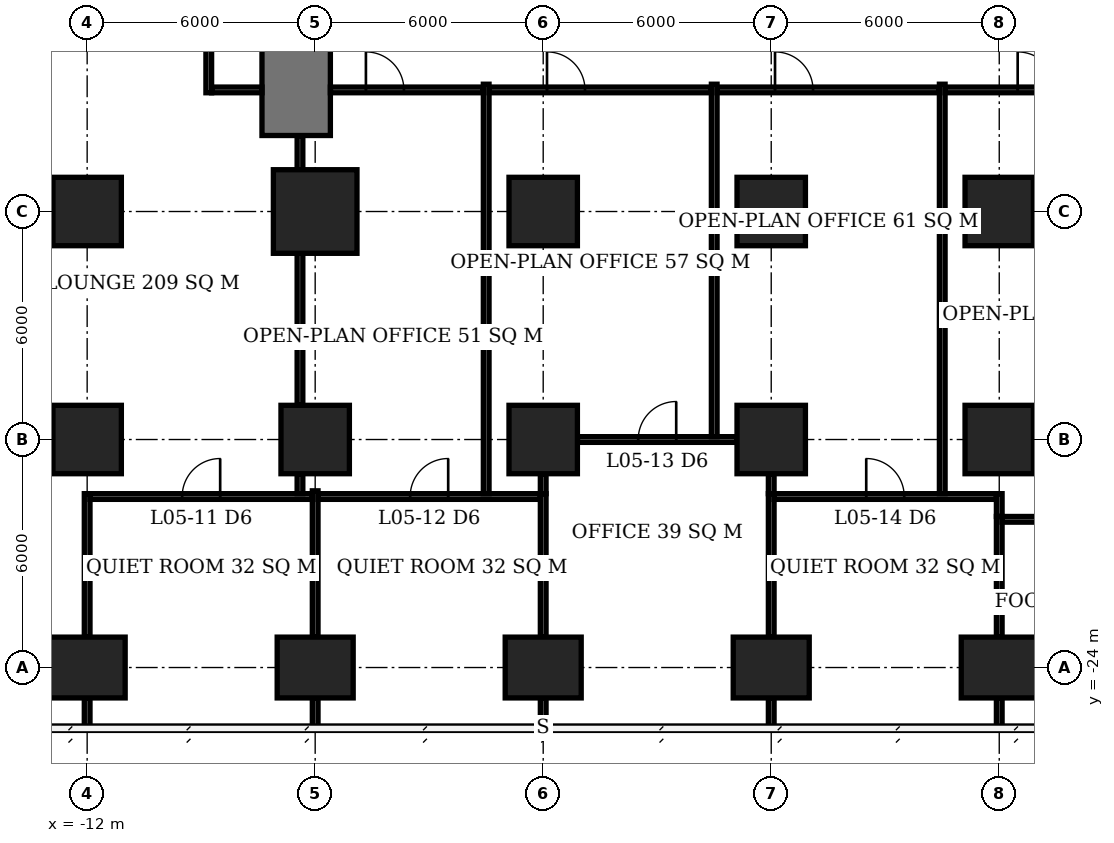
"""IFC4 building model, lengths in metres.
Left out: names, types, materials, properties, quantities, classifications, styles, units other than length and angle.
Written with IfcOpenShell. Run it as: python <this file> out.ifc"""

import sys

from ifc_helpers import new_model, si_unit, direction, frame, frame_2d, origin, origin_2d, place, context, subcontext, project, spatial, rectangle, extrude, element, fill, save


model = new_model("IFC4")
c1 = context("Model", 3, precision=1e-05, world=origin(), true_north=direction((0.0, 1.0)))
c2 = subcontext(c1, "Body", "Model", "MODEL_VIEW")
j1 = project(units=[si_unit("LENGTHUNIT", "METRE"), si_unit("PLANEANGLEUNIT", "RADIAN")], contexts=[c1])
p1 = place(None, origin())
s1 = spatial("IfcSite", under=j1, at=p1, CompositionType="ELEMENT")
p2 = place(p1, origin())
s2 = spatial("IfcBuilding", under=s1, at=p2, CompositionType="ELEMENT")
p3 = place(p2, frame((0.0, 0.0, 26.0)))
s3 = spatial("IfcBuildingStorey", under=s2, at=p3, CompositionType="ELEMENT", Elevation=26.0)
p4 = place(p3, frame((-12.0, -24.0, 0.0), z_axis=(0.0, 0.0, 1.0), x_axis=(1.0, 0.0, 0.0)))
e1 = element("IfcColumn", 1, at=p4, inside=s3, PredefinedType="COLUMN", context=c2, shape_type="SweptSolid", body=[
    extrude(rectangle(XDim=2.0, YDim=1.6, at=origin_2d()), origin(), (0.0, 0.0, 1.0), 3.9),
])
for number, where, z_axis, x_axis in (
    (2, (-12.0, -18.0, 0.0), (0.0, 0.0, 1.0), (1.0, 0.0, 0.0)),
    (3, (-12.0, -12.0, 0.0), (0.0, 0.0, 1.0), (1.0, 0.0, 0.0)),
):
    element("IfcColumn", number, at=place(p3, frame(where, z_axis=z_axis, x_axis=x_axis)), inside=s3, PredefinedType="COLUMN", context=c2, shape_type="SweptSolid", body=[
        extrude(rectangle(XDim=1.8, YDim=1.8, at=origin_2d()), origin(), (0.0, 0.0, 1.0), 3.9),
    ])
p5 = place(p3, frame((-6.0, -24.0, 0.0), z_axis=(0.0, 0.0, 1.0), x_axis=(1.0, 0.0, 0.0)))
e4 = element("IfcColumn", 4, at=p5, inside=s3, PredefinedType="COLUMN", context=c2, shape_type="SweptSolid", body=[
    extrude(rectangle(XDim=2.0, YDim=1.6, at=origin_2d()), origin(), (0.0, 0.0, 1.0), 3.9),
])
p6 = place(p3, frame((-6.0, -18.0, 0.0), z_axis=(0.0, 0.0, 1.0), x_axis=(1.0, 0.0, 0.0)))
e5 = element("IfcColumn", 5, at=p6, inside=s3, PredefinedType="COLUMN", context=c2, shape_type="SweptSolid", body=[
    extrude(rectangle(XDim=1.8, YDim=1.8, at=origin_2d()), origin(), (0.0, 0.0, 1.0), 3.9),
])
p7 = place(p3, frame((-6.0, -12.0, 0.0), z_axis=(0.0, 0.0, 1.0), x_axis=(1.0, 0.0, 0.0)))
e6 = element("IfcColumn", 6, at=p7, inside=s3, PredefinedType="COLUMN", context=c2, shape_type="SweptSolid", body=[
    extrude(rectangle(XDim=2.2, YDim=2.2, at=origin_2d()), origin(), (0.0, 0.0, 1.0), 3.9),
])
p8 = place(p3, frame((0.0, -24.0, 0.0), z_axis=(0.0, 0.0, 1.0), x_axis=(1.0, 0.0, 0.0)))
e7 = element("IfcColumn", 7, at=p8, inside=s3, PredefinedType="COLUMN", context=c2, shape_type="SweptSolid", body=[
    extrude(rectangle(XDim=2.0, YDim=1.6, at=origin_2d()), origin(), (0.0, 0.0, 1.0), 3.9),
])
for number, where, z_axis, x_axis in (
    (8, (0.0, -18.0, 0.0), (0.0, 0.0, 1.0), (1.0, 0.0, 0.0)),
    (9, (0.0, -12.0, 0.0), (0.0, 0.0, 1.0), (1.0, 0.0, 0.0)),
):
    element("IfcColumn", number, at=place(p3, frame(where, z_axis=z_axis, x_axis=x_axis)), inside=s3, PredefinedType="COLUMN", context=c2, shape_type="SweptSolid", body=[
        extrude(rectangle(XDim=1.8, YDim=1.8, at=origin_2d()), origin(), (0.0, 0.0, 1.0), 3.9),
    ])
p9 = place(p3, frame((6.0, -24.0, 0.0), z_axis=(0.0, 0.0, 1.0), x_axis=(1.0, 0.0, 0.0)))
e10 = element("IfcColumn", 10, at=p9, inside=s3, PredefinedType="COLUMN", context=c2, shape_type="SweptSolid", body=[
    extrude(rectangle(XDim=2.0, YDim=1.6, at=origin_2d()), origin(), (0.0, 0.0, 1.0), 3.9),
])
for number, where, z_axis, x_axis in (
    (11, (6.0, -18.0, 0.0), (0.0, 0.0, 1.0), (1.0, 0.0, 0.0)),
    (12, (6.0, -12.0, 0.0), (0.0, 0.0, 1.0), (1.0, 0.0, 0.0)),
):
    element("IfcColumn", number, at=place(p3, frame(where, z_axis=z_axis, x_axis=x_axis)), inside=s3, PredefinedType="COLUMN", context=c2, shape_type="SweptSolid", body=[
        extrude(rectangle(XDim=1.8, YDim=1.8, at=origin_2d()), origin(), (0.0, 0.0, 1.0), 3.9),
    ])
p10 = place(p3, frame((12.0, -24.0, 0.0), z_axis=(0.0, 0.0, 1.0), x_axis=(1.0, 0.0, 0.0)))
e13 = element("IfcColumn", 13, at=p10, inside=s3, PredefinedType="COLUMN", context=c2, shape_type="SweptSolid", body=[
    extrude(rectangle(XDim=2.0, YDim=1.6, at=origin_2d()), origin(), (0.0, 0.0, 1.0), 3.9),
])
for number, where, z_axis, x_axis in (
    (14, (12.0, -18.0, 0.0), (0.0, 0.0, 1.0), (1.0, 0.0, 0.0)),
    (15, (12.0, -12.0, 0.0), (0.0, 0.0, 1.0), (1.0, 0.0, 0.0)),
):
    element("IfcColumn", number, at=place(p3, frame(where, z_axis=z_axis, x_axis=x_axis)), inside=s3, PredefinedType="COLUMN", context=c2, shape_type="SweptSolid", body=[
        extrude(rectangle(XDim=1.8, YDim=1.8, at=origin_2d()), origin(), (0.0, 0.0, 1.0), 3.9),
    ])
p11 = place(p3, frame((-6.5, -10.0, 0.0), z_axis=(0.0, 0.0, 1.0), x_axis=(0.0, 1.0, 0.0)))
e16 = element("IfcWall", 16, at=p11, inside=s3, PredefinedType="SHEAR", context=c2, shape_type="SweptSolid", body=[
    extrude(rectangle(XDim=2.4, YDim=1.8, at=frame_2d((1.2, 0.0))), origin(), (0.0, 0.0, 1.0), 3.9),
])
p12 = place(p3, frame((12.075, -20.1, 0.0), z_axis=(0.0, 0.0, 1.0), x_axis=(1.0, 0.0, 0.0)))
e17 = element("IfcWall", 17, at=p12, inside=s3, PredefinedType="PARTITIONING", context=c2, shape_type="SweptSolid", body=[
    extrude(rectangle(XDim=5.85, YDim=0.15, at=frame_2d((2.925, 0.0))), origin(), (0.0, 0.0, 1.0), 3.65),
])
p13 = place(p12, frame((2.425, 0.0, 0.0)))
e18 = element("IfcOpeningElement", 18, at=p13, cuts=e17, PredefinedType="OPENING", context=c2, shape_type="SweptSolid", body=[
    extrude(rectangle(XDim=1.0, YDim=2.1, at=frame_2d((0.5, 1.05))), frame((0.0, 0.085, 0.0), z_axis=(0.0, -1.0, 0.0), x_axis=(1.0, 0.0, 0.0)), (0.0, 0.0, 1.0), 0.17),
])
p14 = place(p3, frame((-11.925, -19.5, 0.0), z_axis=(0.0, 0.0, 1.0), x_axis=(1.0, 0.0, 0.0)))
e19 = element("IfcWall", 19, at=p14, inside=s3, PredefinedType="PARTITIONING", context=c2, shape_type="SweptSolid", body=[
    extrude(rectangle(XDim=5.85, YDim=0.15, at=frame_2d((2.925, 0.0))), origin(), (0.0, 0.0, 1.0), 3.65),
])
p15 = place(p14, frame((2.425, 0.0, 0.0)))
e20 = element("IfcOpeningElement", 20, at=p15, cuts=e19, PredefinedType="OPENING", context=c2, shape_type="SweptSolid", body=[
    extrude(rectangle(XDim=1.0, YDim=2.1, at=frame_2d((0.5, 1.05))), frame((0.0, 0.085, 0.0), z_axis=(0.0, -1.0, 0.0), x_axis=(1.0, 0.0, 0.0)), (0.0, 0.0, 1.0), 0.17),
])
p16 = place(p3, frame((-5.925, -19.5, 0.0), z_axis=(0.0, 0.0, 1.0), x_axis=(1.0, 0.0, 0.0)))
e21 = element("IfcWall", 21, at=p16, inside=s3, PredefinedType="PARTITIONING", context=c2, shape_type="SweptSolid", body=[
    extrude(rectangle(XDim=5.85, YDim=0.15, at=frame_2d((2.925, 0.0))), origin(), (0.0, 0.0, 1.0), 3.65),
])
p17 = place(p16, frame((2.425, 0.0, 0.0)))
e22 = element("IfcOpeningElement", 22, at=p17, cuts=e21, PredefinedType="OPENING", context=c2, shape_type="SweptSolid", body=[
    extrude(rectangle(XDim=1.0, YDim=2.1, at=frame_2d((0.5, 1.05))), frame((0.0, 0.085, 0.0), z_axis=(0.0, -1.0, 0.0), x_axis=(1.0, 0.0, 0.0)), (0.0, 0.0, 1.0), 0.17),
])
p18 = place(p3, frame((6.075, -19.5, 0.0), z_axis=(0.0, 0.0, 1.0), x_axis=(1.0, 0.0, 0.0)))
e23 = element("IfcWall", 23, at=p18, inside=s3, PredefinedType="PARTITIONING", context=c2, shape_type="SweptSolid", body=[
    extrude(rectangle(XDim=5.85, YDim=0.15, at=frame_2d((2.925, 0.0))), origin(), (0.0, 0.0, 1.0), 3.65),
])
p19 = place(p18, frame((2.425, 0.0, 0.0)))
e24 = element("IfcOpeningElement", 24, at=p19, cuts=e23, PredefinedType="OPENING", context=c2, shape_type="SweptSolid", body=[
    extrude(rectangle(XDim=1.0, YDim=2.1, at=frame_2d((0.5, 1.05))), frame((0.0, 0.085, 0.0), z_axis=(0.0, -1.0, 0.0), x_axis=(1.0, 0.0, 0.0)), (0.0, 0.0, 1.0), 0.17),
])
p20 = place(p3, frame((0.9, -18.0, 0.0), z_axis=(0.0, 0.0, 1.0), x_axis=(1.0, 0.0, 0.0)))
e25 = element("IfcWall", 25, at=p20, inside=s3, PredefinedType="PARTITIONING", context=c2, shape_type="SweptSolid", body=[
    extrude(rectangle(XDim=4.2, YDim=0.15, at=frame_2d((2.1, 0.0))), origin(), (0.0, 0.0, 1.0), 3.65),
])
p21 = place(p20, frame((1.6, 0.0, 0.0)))
e26 = element("IfcOpeningElement", 26, at=p21, cuts=e25, PredefinedType="OPENING", context=c2, shape_type="SweptSolid", body=[
    extrude(rectangle(XDim=1.0, YDim=2.1, at=frame_2d((0.5, 1.05))), frame((0.0, 0.085, 0.0), z_axis=(0.0, -1.0, 0.0), x_axis=(1.0, 0.0, 0.0)), (0.0, 0.0, 1.0), 0.17),
])
p22 = place(p3, frame((-12.0, -25.6, 0.0), z_axis=(0.0, 0.0, 1.0), x_axis=(0.0, 1.0, 0.0)))
e27 = element("IfcWall", 27, at=p22, inside=s3, PredefinedType="PARTITIONING", context=c2, shape_type="SweptSolid", body=[
    extrude(rectangle(XDim=0.8, YDim=0.15, at=frame_2d((0.4, 0.0))), origin(), (0.0, 0.0, 1.0), 3.65),
])
p23 = place(p3, frame((-12.0, -23.2, 0.0), z_axis=(0.0, 0.0, 1.0), x_axis=(0.0, 1.0, 0.0)))
e28 = element("IfcWall", 28, at=p23, inside=s3, PredefinedType="PARTITIONING", context=c2, shape_type="SweptSolid", body=[
    extrude(rectangle(XDim=3.775, YDim=0.15, at=frame_2d((1.887, 0.0))), origin(), (0.0, 0.0, 1.0), 3.65),
])
p24 = place(p3, frame((-6.0, -25.6, 0.0), z_axis=(0.0, 0.0, 1.0), x_axis=(0.0, 1.0, 0.0)))
e29 = element("IfcWall", 29, at=p24, inside=s3, PredefinedType="PARTITIONING", context=c2, shape_type="SweptSolid", body=[
    extrude(rectangle(XDim=0.8, YDim=0.15, at=frame_2d((0.4, 0.0))), origin(), (0.0, 0.0, 1.0), 3.65),
])
p25 = place(p3, frame((-6.0, -23.2, 0.0), z_axis=(0.0, 0.0, 1.0), x_axis=(0.0, 1.0, 0.0)))
e30 = element("IfcWall", 30, at=p25, inside=s3, PredefinedType="PARTITIONING", context=c2, shape_type="SweptSolid", body=[
    extrude(rectangle(XDim=3.85, YDim=0.15, at=frame_2d((1.925, 0.0))), origin(), (0.0, 0.0, 1.0), 3.65),
])
p26 = place(p3, frame((0.0, -25.55, 0.0), z_axis=(0.0, 0.0, 1.0), x_axis=(0.0, 1.0, 0.0)))
e31 = element("IfcWall", 31, at=p26, inside=s3, PredefinedType="PARTITIONING", context=c2, shape_type="SweptSolid", body=[
    extrude(rectangle(XDim=0.75, YDim=0.15, at=frame_2d((0.375, 0.0))), origin(), (0.0, 0.0, 1.0), 3.65),
])
p27 = place(p3, frame((0.0, -23.2, 0.0), z_axis=(0.0, 0.0, 1.0), x_axis=(0.0, 1.0, 0.0)))
e32 = element("IfcWall", 32, at=p27, inside=s3, PredefinedType="PARTITIONING", context=c2, shape_type="SweptSolid", body=[
    extrude(rectangle(XDim=3.775, YDim=0.15, at=frame_2d((1.887, 0.0))), origin(), (0.0, 0.0, 1.0), 3.65),
])
p28 = place(p3, frame((0.0, -19.425, 0.0), z_axis=(0.0, 0.0, 1.0), x_axis=(0.0, 1.0, 0.0)))
e33 = element("IfcWall", 33, at=p28, inside=s3, PredefinedType="PARTITIONING", context=c2, shape_type="SweptSolid", body=[
    extrude(rectangle(XDim=0.525, YDim=0.15, at=frame_2d((0.263, 0.0))), origin(), (0.0, 0.0, 1.0), 3.65),
])
p29 = place(p3, frame((6.0, -25.6, 0.0), z_axis=(0.0, 0.0, 1.0), x_axis=(0.0, 1.0, 0.0)))
e34 = element("IfcWall", 34, at=p29, inside=s3, PredefinedType="PARTITIONING", context=c2, shape_type="SweptSolid", body=[
    extrude(rectangle(XDim=0.8, YDim=0.15, at=frame_2d((0.4, 0.0))), origin(), (0.0, 0.0, 1.0), 3.65),
])
p30 = place(p3, frame((6.0, -23.2, 0.0), z_axis=(0.0, 0.0, 1.0), x_axis=(0.0, 1.0, 0.0)))
e35 = element("IfcWall", 35, at=p30, inside=s3, PredefinedType="PARTITIONING", context=c2, shape_type="SweptSolid", body=[
    extrude(rectangle(XDim=3.775, YDim=0.15, at=frame_2d((1.887, 0.0))), origin(), (0.0, 0.0, 1.0), 3.65),
])
p31 = place(p3, frame((6.0, -19.425, 0.0), z_axis=(0.0, 0.0, 1.0), x_axis=(0.0, 1.0, 0.0)))
e36 = element("IfcWall", 36, at=p31, inside=s3, PredefinedType="PARTITIONING", context=c2, shape_type="SweptSolid", body=[
    extrude(rectangle(XDim=0.525, YDim=0.15, at=frame_2d((0.263, 0.0))), origin(), (0.0, 0.0, 1.0), 3.65),
])
p32 = place(p3, frame((12.0, -25.6, 0.0), z_axis=(0.0, 0.0, 1.0), x_axis=(0.0, 1.0, 0.0)))
e37 = element("IfcWall", 37, at=p32, inside=s3, PredefinedType="PARTITIONING", context=c2, shape_type="SweptSolid", body=[
    extrude(rectangle(XDim=0.8, YDim=0.15, at=frame_2d((0.4, 0.0))), origin(), (0.0, 0.0, 1.0), 3.65),
])
p33 = place(p3, frame((12.0, -23.2, 0.0), z_axis=(0.0, 0.0, 1.0), x_axis=(0.0, 1.0, 0.0)))
e38 = element("IfcWall", 38, at=p33, inside=s3, PredefinedType="PARTITIONING", context=c2, shape_type="SweptSolid", body=[
    extrude(rectangle(XDim=3.175, YDim=0.15, at=frame_2d((1.587, 0.0))), origin(), (0.0, 0.0, 1.0), 3.65),
])
p34 = place(p3, frame((12.0, -20.025, 0.0), z_axis=(0.0, 0.0, 1.0), x_axis=(0.0, 1.0, 0.0)))
e39 = element("IfcWall", 39, at=p34, inside=s3, PredefinedType="PARTITIONING", context=c2, shape_type="SweptSolid", body=[
    extrude(rectangle(XDim=0.6, YDim=0.15, at=frame_2d((0.3, 0.0))), origin(), (0.0, 0.0, 1.0), 3.65),
])
p35 = place(p3, frame((-8.8, -8.875, 0.0), z_axis=(0.0, 0.0, 1.0), x_axis=(0.0, 1.0, 0.0)))
e40 = element("IfcWall", 40, at=p35, inside=s3, PredefinedType="PARTITIONING", context=c2, shape_type="SweptSolid", body=[
    extrude(rectangle(XDim=1.375, YDim=0.15, at=frame_2d((0.688, 0.0))), origin(), (0.0, 0.0, 1.0), 3.65),
])
p36 = place(p3, frame((-8.725, -8.8, 0.0), z_axis=(0.0, 0.0, 1.0), x_axis=(1.0, 0.0, 0.0)))
e41 = element("IfcWall", 41, at=p36, inside=s3, PredefinedType="PARTITIONING", context=c2, shape_type="SweptSolid", body=[
    extrude(rectangle(XDim=1.325, YDim=0.15, at=frame_2d((0.663, 0.0))), origin(), (0.0, 0.0, 1.0), 3.65),
])
p37 = place(p3, frame((-6.4, -19.425, 0.0), z_axis=(0.0, 0.0, 1.0), x_axis=(0.0, 1.0, 0.0)))
e42 = element("IfcWall", 42, at=p37, inside=s3, PredefinedType="PARTITIONING", context=c2, shape_type="SweptSolid", body=[
    extrude(rectangle(XDim=0.525, YDim=0.15, at=frame_2d((0.263, 0.0))), origin(), (0.0, 0.0, 1.0), 3.65),
])
p38 = place(p3, frame((-6.4, -17.1, 0.0), z_axis=(0.0, 0.0, 1.0), x_axis=(0.0, 1.0, 0.0)))
e43 = element("IfcWall", 43, at=p38, inside=s3, PredefinedType="PARTITIONING", context=c2, shape_type="SweptSolid", body=[
    extrude(rectangle(XDim=4.0, YDim=0.15, at=frame_2d((2.0, 0.0))), origin(), (0.0, 0.0, 1.0), 3.65),
])
p39 = place(p3, frame((-6.4, -10.9, 0.0), z_axis=(0.0, 0.0, 1.0), x_axis=(0.0, 1.0, 0.0)))
e44 = element("IfcWall", 44, at=p39, inside=s3, PredefinedType="PARTITIONING", context=c2, shape_type="SweptSolid", body=[
    extrude(rectangle(XDim=0.9, YDim=0.15, at=frame_2d((0.45, 0.0))), origin(), (0.0, 0.0, 1.0), 3.65),
])
p40 = place(p3, frame((-5.6, -8.8, 0.0), z_axis=(0.0, 0.0, 1.0), x_axis=(1.0, 0.0, 0.0)))
e45 = element("IfcWall", 45, at=p40, inside=s3, PredefinedType="PARTITIONING", context=c2, shape_type="SweptSolid", body=[
    extrude(rectangle(XDim=4.025, YDim=0.15, at=frame_2d((2.013, 0.0))), origin(), (0.0, 0.0, 1.0), 3.65),
])
p41 = place(p40, frame((0.935, 0.0, 0.0)))
e46 = element("IfcOpeningElement", 46, at=p41, cuts=e45, PredefinedType="OPENING", context=c2, shape_type="SweptSolid", body=[
    extrude(rectangle(XDim=1.0, YDim=2.1, at=frame_2d((0.5, 1.05))), frame((0.0, 0.085, 0.0), z_axis=(0.0, -1.0, 0.0), x_axis=(1.0, 0.0, 0.0)), (0.0, 0.0, 1.0), 0.17),
])
p42 = place(p3, frame((-1.5, -19.425, 0.0), z_axis=(0.0, 0.0, 1.0), x_axis=(0.0, 1.0, 0.0)))
e47 = element("IfcWall", 47, at=p42, inside=s3, PredefinedType="PARTITIONING", context=c2, shape_type="SweptSolid", body=[
    extrude(rectangle(XDim=10.775, YDim=0.15, at=frame_2d((5.388, 0.0))), origin(), (0.0, 0.0, 1.0), 3.65),
])
p43 = place(p3, frame((-1.425, -8.8, 0.0), z_axis=(0.0, 0.0, 1.0), x_axis=(1.0, 0.0, 0.0)))
e48 = element("IfcWall", 48, at=p43, inside=s3, PredefinedType="PARTITIONING", context=c2, shape_type="SweptSolid", body=[
    extrude(rectangle(XDim=5.85, YDim=0.15, at=frame_2d((2.925, 0.0))), origin(), (0.0, 0.0, 1.0), 3.65),
])
p44 = place(p43, frame((1.525, 0.0, 0.0)))
e49 = element("IfcOpeningElement", 49, at=p44, cuts=e48, PredefinedType="OPENING", context=c2, shape_type="SweptSolid", body=[
    extrude(rectangle(XDim=1.0, YDim=2.1, at=frame_2d((0.5, 1.05))), frame((0.0, 0.085, 0.0), z_axis=(0.0, -1.0, 0.0), x_axis=(1.0, 0.0, 0.0)), (0.0, 0.0, 1.0), 0.17),
])
p45 = place(p3, frame((4.5, -17.925, 0.0), z_axis=(0.0, 0.0, 1.0), x_axis=(0.0, 1.0, 0.0)))
e50 = element("IfcWall", 50, at=p45, inside=s3, PredefinedType="PARTITIONING", context=c2, shape_type="SweptSolid", body=[
    extrude(rectangle(XDim=9.275, YDim=0.15, at=frame_2d((4.638, 0.0))), origin(), (0.0, 0.0, 1.0), 3.65),
])
p46 = place(p3, frame((4.575, -8.8, 0.0), z_axis=(0.0, 0.0, 1.0), x_axis=(1.0, 0.0, 0.0)))
e51 = element("IfcWall", 51, at=p46, inside=s3, PredefinedType="PARTITIONING", context=c2, shape_type="SweptSolid", body=[
    extrude(rectangle(XDim=5.85, YDim=0.15, at=frame_2d((2.925, 0.0))), origin(), (0.0, 0.0, 1.0), 3.65),
])
p47 = place(p46, frame((1.525, 0.0, 0.0)))
e52 = element("IfcOpeningElement", 52, at=p47, cuts=e51, PredefinedType="OPENING", context=c2, shape_type="SweptSolid", body=[
    extrude(rectangle(XDim=1.0, YDim=2.1, at=frame_2d((0.5, 1.05))), frame((0.0, 0.085, 0.0), z_axis=(0.0, -1.0, 0.0), x_axis=(1.0, 0.0, 0.0)), (0.0, 0.0, 1.0), 0.17),
])
p48 = place(p3, frame((10.5, -19.425, 0.0), z_axis=(0.0, 0.0, 1.0), x_axis=(0.0, 1.0, 0.0)))
e53 = element("IfcWall", 53, at=p48, inside=s3, PredefinedType="PARTITIONING", context=c2, shape_type="SweptSolid", body=[
    extrude(rectangle(XDim=10.775, YDim=0.15, at=frame_2d((5.388, 0.0))), origin(), (0.0, 0.0, 1.0), 3.65),
])
p49 = place(p3, frame((10.575, -8.8, 0.0), z_axis=(0.0, 0.0, 1.0), x_axis=(1.0, 0.0, 0.0)))
e54 = element("IfcWall", 54, at=p49, inside=s3, PredefinedType="PARTITIONING", context=c2, shape_type="SweptSolid", body=[
    extrude(rectangle(XDim=7.025, YDim=0.15, at=frame_2d((3.513, 0.0))), origin(), (0.0, 0.0, 1.0), 3.65),
])
p50 = place(p49, frame((1.91, 0.0, 0.0)))
e55 = element("IfcOpeningElement", 55, at=p50, cuts=e54, PredefinedType="OPENING", context=c2, shape_type="SweptSolid", body=[
    extrude(rectangle(XDim=1.0, YDim=2.1, at=frame_2d((0.5, 1.05))), frame((0.0, 0.085, 0.0), z_axis=(0.0, -1.0, 0.0), x_axis=(1.0, 0.0, 0.0)), (0.0, 0.0, 1.0), 0.17),
])
p51 = place(p15, origin())
e56 = element("IfcDoor", 56, at=p51, inside=s3, OperationType="SINGLE_SWING_RIGHT", PredefinedType="DOOR", context=c2, shape_type="SweptSolid", body=[
    extrude(rectangle(XDim=1.0, YDim=2.1, at=frame_2d((0.5, 1.05))), frame((0.0, 0.025, 0.0), z_axis=(0.0, -1.0, 0.0), x_axis=(1.0, 0.0, 0.0)), (0.0, 0.0, 1.0), 0.05),
])
fill(e20, e56)
p52 = place(p17, origin())
e57 = element("IfcDoor", 57, at=p52, inside=s3, OperationType="SINGLE_SWING_RIGHT", PredefinedType="DOOR", context=c2, shape_type="SweptSolid", body=[
    extrude(rectangle(XDim=1.0, YDim=2.1, at=frame_2d((0.5, 1.05))), frame((0.0, 0.025, 0.0), z_axis=(0.0, -1.0, 0.0), x_axis=(1.0, 0.0, 0.0)), (0.0, 0.0, 1.0), 0.05),
])
fill(e22, e57)
p53 = place(p21, origin())
e58 = element("IfcDoor", 58, at=p53, inside=s3, OperationType="SINGLE_SWING_RIGHT", PredefinedType="DOOR", context=c2, shape_type="SweptSolid", body=[
    extrude(rectangle(XDim=1.0, YDim=2.1, at=frame_2d((0.5, 1.05))), frame((0.0, 0.025, 0.0), z_axis=(0.0, -1.0, 0.0), x_axis=(1.0, 0.0, 0.0)), (0.0, 0.0, 1.0), 0.05),
])
fill(e26, e58)
p54 = place(p19, origin())
e59 = element("IfcDoor", 59, at=p54, inside=s3, OperationType="SINGLE_SWING_LEFT", PredefinedType="DOOR", context=c2, shape_type="SweptSolid", body=[
    extrude(rectangle(XDim=1.0, YDim=2.1, at=frame_2d((0.5, 1.05))), frame((0.0, 0.025, 0.0), z_axis=(0.0, -1.0, 0.0), x_axis=(1.0, 0.0, 0.0)), (0.0, 0.0, 1.0), 0.05),
])
fill(e24, e59)
p55 = place(p50, origin())
e60 = element("IfcDoor", 60, at=p55, inside=s3, OperationType="SINGLE_SWING_LEFT", PredefinedType="DOOR", context=c2, shape_type="SweptSolid", body=[
    extrude(rectangle(XDim=1.0, YDim=2.1, at=frame_2d((0.5, 1.05))), frame((0.0, 0.025, 0.0), z_axis=(0.0, -1.0, 0.0), x_axis=(1.0, 0.0, 0.0)), (0.0, 0.0, 1.0), 0.05),
])
fill(e55, e60)
p56 = place(p41, origin())
e61 = element("IfcDoor", 61, at=p56, inside=s3, OperationType="SINGLE_SWING_LEFT", PredefinedType="DOOR", context=c2, shape_type="SweptSolid", body=[
    extrude(rectangle(XDim=1.0, YDim=2.1, at=frame_2d((0.5, 1.05))), frame((0.0, 0.025, 0.0), z_axis=(0.0, -1.0, 0.0), x_axis=(1.0, 0.0, 0.0)), (0.0, 0.0, 1.0), 0.05),
])
fill(e46, e61)
p57 = place(p47, origin())
e62 = element("IfcDoor", 62, at=p57, inside=s3, OperationType="SINGLE_SWING_LEFT", PredefinedType="DOOR", context=c2, shape_type="SweptSolid", body=[
    extrude(rectangle(XDim=1.0, YDim=2.1, at=frame_2d((0.5, 1.05))), frame((0.0, 0.025, 0.0), z_axis=(0.0, -1.0, 0.0), x_axis=(1.0, 0.0, 0.0)), (0.0, 0.0, 1.0), 0.05),
])
fill(e52, e62)
p58 = place(p44, origin())
e63 = element("IfcDoor", 63, at=p58, inside=s3, OperationType="SINGLE_SWING_LEFT", PredefinedType="DOOR", context=c2, shape_type="SweptSolid", body=[
    extrude(rectangle(XDim=1.0, YDim=2.1, at=frame_2d((0.5, 1.05))), frame((0.0, 0.025, 0.0), z_axis=(0.0, -1.0, 0.0), x_axis=(1.0, 0.0, 0.0)), (0.0, 0.0, 1.0), 0.05),
])
fill(e49, e63)
save(model, sys.argv[1])
